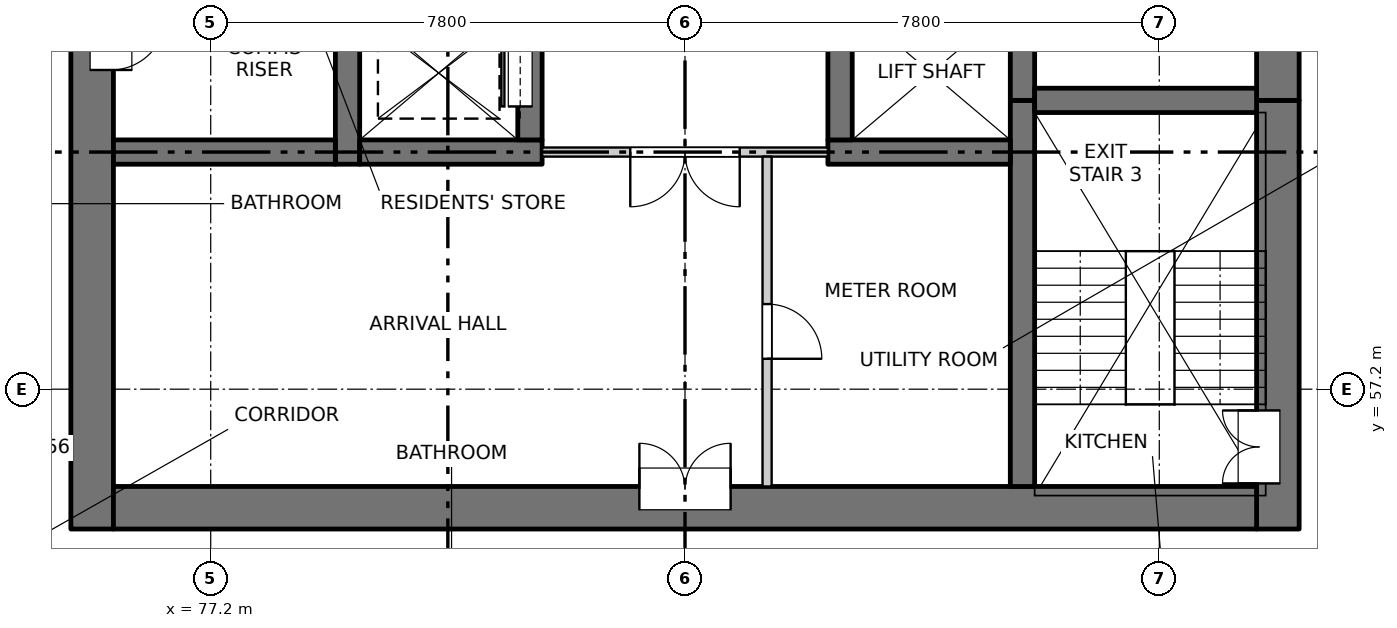
"""IFC4 building model, lengths in metres.
Left out: names, types, materials, properties, quantities, classifications, styles, units other than length and angle.
Written with IfcOpenShell. Run it as: python <this file> out.ifc"""

import sys

from ifc_helpers import new_model, si_unit, direction, frame, frame_2d, origin, place, context, subcontext, project, spatial, rectangle, extrude, element, fill, save


model = new_model("IFC4")
c1 = context("Model", 3, precision=1e-05, world=origin(), true_north=direction((0.0, 1.0)))
c2 = subcontext(c1, "Body", "Model", "MODEL_VIEW")
j1 = project(units=[si_unit("LENGTHUNIT", "METRE"), si_unit("PLANEANGLEUNIT", "RADIAN")], contexts=[c1])
p1 = place(None, origin())
s1 = spatial("IfcSite", under=j1, at=p1, CompositionType="ELEMENT")
p2 = place(p1, origin())
s2 = spatial("IfcBuilding", under=s1, at=p2, CompositionType="ELEMENT")
p3 = place(p2, frame((0.0, 0.0, 19.5)))
s3 = spatial("IfcBuildingStorey", under=s2, at=p3, CompositionType="ELEMENT", Elevation=19.5)
p4 = place(p3, frame((75.25, 54.9, -0.25), z_axis=(0.0, 0.0, 1.0), x_axis=(0.0, 1.0, 0.0)))
e1 = element("IfcWall", 1, at=p4, inside=s3, PredefinedType="SOLIDWALL", context=c2, shape_type="SweptSolid", body=[
    extrude(rectangle(XDim=22.4, YDim=0.7, at=frame_2d((11.2, 0.0))), origin(), (0.0, 0.0, 1.0), 3.4),
])
p5 = place(p4, frame((7.55, 0.0, 0.25)))
e2 = element("IfcOpeningElement", 2, at=p5, cuts=e1, PredefinedType="OPENING", context=c2, shape_type="SweptSolid", body=[
    extrude(rectangle(XDim=0.9, YDim=2.1, at=frame_2d((0.45, 1.05))), frame((0.0, 0.36, 0.0), z_axis=(0.0, -1.0, 0.0), x_axis=(1.0, 0.0, 0.0)), (0.0, 0.0, 1.0), 0.72),
])
p6 = place(p4, frame((10.85, 0.0, 0.25)))
e3 = element("IfcOpeningElement", 3, at=p6, cuts=e1, PredefinedType="OPENING", context=c2, shape_type="SweptSolid", body=[
    extrude(rectangle(XDim=0.9, YDim=2.1, at=frame_2d((0.45, 1.05))), frame((0.0, 0.36, 0.0), z_axis=(0.0, -1.0, 0.0), x_axis=(1.0, 0.0, 0.0)), (0.0, 0.0, 1.0), 0.72),
])
p7 = place(p4, frame((15.35, 0.0, 0.25)))
e4 = element("IfcOpeningElement", 4, at=p7, cuts=e1, PredefinedType="OPENING", context=c2, shape_type="SweptSolid", body=[
    extrude(rectangle(XDim=0.9, YDim=2.1, at=frame_2d((0.45, 1.05))), frame((0.0, 0.36, 0.0), z_axis=(0.0, -1.0, 0.0), x_axis=(1.0, 0.0, 0.0)), (0.0, 0.0, 1.0), 0.72),
])
p8 = place(p4, frame((20.15, 0.0, 0.25)))
e5 = element("IfcOpeningElement", 5, at=p8, cuts=e1, PredefinedType="OPENING", context=c2, shape_type="SweptSolid", body=[
    extrude(rectangle(XDim=0.9, YDim=2.1, at=frame_2d((0.45, 1.05))), frame((0.0, 0.36, 0.0), z_axis=(0.0, -1.0, 0.0), x_axis=(1.0, 0.0, 0.0)), (0.0, 0.0, 1.0), 0.72),
])
p9 = place(p3, frame((94.75, 54.9, -0.25), z_axis=(0.0, 0.0, 1.0), x_axis=(0.0, 1.0, 0.0)))
e6 = element("IfcWall", 6, at=p9, inside=s3, PredefinedType="SOLIDWALL", context=c2, shape_type="SweptSolid", body=[
    extrude(rectangle(XDim=7.05, YDim=0.7, at=frame_2d((3.525, 0.0))), origin(), (0.0, 0.0, 1.0), 3.4),
])
p10 = place(p9, frame((0.75, 0.0, 0.25)))
e7 = element("IfcOpeningElement", 7, at=p10, cuts=e6, PredefinedType="OPENING", context=c2, shape_type="SweptSolid", body=[
    extrude(rectangle(XDim=1.2, YDim=2.1, at=frame_2d((0.6, 1.05))), frame((0.0, 0.36, 0.0), z_axis=(0.0, -1.0, 0.0), x_axis=(1.0, 0.0, 0.0)), (0.0, 0.0, 1.0), 0.72),
])
p11 = place(p3, frame((94.75, 61.95, -0.25), z_axis=(0.0, 0.0, 1.0), x_axis=(0.0, 1.0, 0.0)))
e8 = element("IfcWall", 8, at=p11, inside=s3, PredefinedType="SOLIDWALL", context=c2, shape_type="SweptSolid", body=[
    extrude(rectangle(XDim=15.35, YDim=0.7, at=frame_2d((7.675, 0.0))), origin(), (0.0, 0.0, 1.0), 3.4),
])
p12 = place(p11, frame((0.925, 0.0, 0.25)))
e9 = element("IfcOpeningElement", 9, at=p12, cuts=e8, PredefinedType="OPENING", context=c2, shape_type="SweptSolid", body=[
    extrude(rectangle(XDim=0.9, YDim=2.1, at=frame_2d((0.45, 1.05))), frame((0.0, 0.36, 0.0), z_axis=(0.0, -1.0, 0.0), x_axis=(1.0, 0.0, 0.0)), (0.0, 0.0, 1.0), 0.72),
])
p13 = place(p11, frame((6.8, 0.0, 0.25)))
e10 = element("IfcOpeningElement", 10, at=p13, cuts=e8, PredefinedType="OPENING", context=c2, shape_type="SweptSolid", body=[
    extrude(rectangle(XDim=0.9, YDim=2.1, at=frame_2d((0.45, 1.05))), frame((0.0, 0.36, 0.0), z_axis=(0.0, -1.0, 0.0), x_axis=(1.0, 0.0, 0.0)), (0.0, 0.0, 1.0), 0.72),
])
p14 = place(p11, frame((13.1, 0.0, 0.25)))
e11 = element("IfcOpeningElement", 11, at=p14, cuts=e8, PredefinedType="OPENING", context=c2, shape_type="SweptSolid", body=[
    extrude(rectangle(XDim=0.9, YDim=2.1, at=frame_2d((0.45, 1.05))), frame((0.0, 0.36, 0.0), z_axis=(0.0, -1.0, 0.0), x_axis=(1.0, 0.0, 0.0)), (0.0, 0.0, 1.0), 0.72),
])
p15 = place(p3, frame((75.6, 55.25, -0.25), z_axis=(0.0, 0.0, 1.0), x_axis=(1.0, 0.0, 0.0)))
e12 = element("IfcWall", 12, at=p15, inside=s3, PredefinedType="SOLIDWALL", context=c2, shape_type="SweptSolid", body=[
    extrude(rectangle(XDim=18.8, YDim=0.7, at=frame_2d((9.4, 0.0))), origin(), (0.0, 0.0, 1.0), 3.4),
])
p16 = place(p15, frame((8.65, 0.0, 0.25)))
e13 = element("IfcOpeningElement", 13, at=p16, cuts=e12, PredefinedType="OPENING", context=c2, shape_type="SweptSolid", body=[
    extrude(rectangle(XDim=1.5, YDim=2.1, at=frame_2d((0.75, 1.05))), frame((0.0, 0.36, 0.0), z_axis=(0.0, -1.0, 0.0), x_axis=(1.0, 0.0, 0.0)), (0.0, 0.0, 1.0), 0.72),
])
p17 = place(p3, frame((79.45, 60.9, -0.25), z_axis=(0.0, 0.0, 1.0), x_axis=(0.0, 1.0, 0.0)))
e14 = element("IfcWall", 14, at=p17, inside=s3, PredefinedType="SOLIDWALL", context=c2, shape_type="SweptSolid", body=[
    extrude(rectangle(XDim=16.4, YDim=0.4, at=frame_2d((8.2, 0.0))), origin(), (0.0, 0.0, 1.0), 3.4),
])
p18 = place(p3, frame((90.55, 55.6, -0.25), z_axis=(0.0, 0.0, 1.0), x_axis=(0.0, 1.0, 0.0)))
e15 = element("IfcWall", 15, at=p18, inside=s3, PredefinedType="SOLIDWALL", context=c2, shape_type="SweptSolid", body=[
    extrude(rectangle(XDim=6.35, YDim=0.4, at=frame_2d((3.175, 0.0))), origin(), (0.0, 0.0, 1.0), 3.4),
])
p19 = place(p3, frame((90.55, 61.95, -0.25), z_axis=(0.0, 0.0, 1.0), x_axis=(0.0, 1.0, 0.0)))
e16 = element("IfcWall", 16, at=p19, inside=s3, PredefinedType="SOLIDWALL", context=c2, shape_type="SweptSolid", body=[
    extrude(rectangle(XDim=15.35, YDim=0.4, at=frame_2d((7.675, 0.0))), origin(), (0.0, 0.0, 1.0), 3.4),
])
p20 = place(p3, frame((79.65, 61.1, -0.25), z_axis=(0.0, 0.0, 1.0), x_axis=(1.0, 0.0, 0.0)))
e17 = element("IfcWall", 17, at=p20, inside=s3, PredefinedType="SOLIDWALL", context=c2, shape_type="SweptSolid", body=[
    extrude(rectangle(XDim=3.0, YDim=0.4, at=frame_2d((1.5, 0.0))), origin(), (0.0, 0.0, 1.0), 3.4),
])
p21 = place(p3, frame((82.45, 61.3, -0.25), z_axis=(0.0, 0.0, 1.0), x_axis=(0.0, 1.0, 0.0)))
e18 = element("IfcWall", 18, at=p21, inside=s3, PredefinedType="SOLIDWALL", context=c2, shape_type="SweptSolid", body=[
    extrude(rectangle(XDim=2.2, YDim=0.4, at=frame_2d((1.1, 0.0))), origin(), (0.0, 0.0, 1.0), 3.4),
])
p22 = place(p21, frame((0.55, 0.0, 0.25)))
e19 = element("IfcOpeningElement", 19, at=p22, cuts=e18, PredefinedType="OPENING", context=c2, shape_type="SweptSolid", body=[
    extrude(rectangle(XDim=1.1, YDim=2.1, at=frame_2d((0.55, 1.05))), frame((0.0, 0.21, 0.0), z_axis=(0.0, -1.0, 0.0), x_axis=(1.0, 0.0, 0.0)), (0.0, 0.0, 1.0), 0.42),
])
p23 = place(p3, frame((87.35, 61.1, -0.25), z_axis=(0.0, 0.0, 1.0), x_axis=(1.0, 0.0, 0.0)))
e20 = element("IfcWall", 20, at=p23, inside=s3, PredefinedType="SOLIDWALL", context=c2, shape_type="SweptSolid", body=[
    extrude(rectangle(XDim=3.0, YDim=0.4, at=frame_2d((1.5, 0.0))), origin(), (0.0, 0.0, 1.0), 3.4),
])
p24 = place(p3, frame((87.55, 61.3, -0.25), z_axis=(0.0, 0.0, 1.0), x_axis=(0.0, 1.0, 0.0)))
e21 = element("IfcWall", 21, at=p24, inside=s3, PredefinedType="SOLIDWALL", context=c2, shape_type="SweptSolid", body=[
    extrude(rectangle(XDim=2.2, YDim=0.4, at=frame_2d((1.1, 0.0))), origin(), (0.0, 0.0, 1.0), 3.4),
])
for number, where, z_axis, x_axis in (
    (22, (75.6, 61.1, -0.25), (0.0, 0.0, 1.0), (1.0, 0.0, 0.0)),
    (23, (90.75, 61.95, -0.25), (0.0, 0.0, 1.0), (1.0, 0.0, 0.0)),
):
    element("IfcWall", number, at=place(p3, frame(where, z_axis=z_axis, x_axis=x_axis)), inside=s3, PredefinedType="SOLIDWALL", context=c2, shape_type="SweptSolid", body=[
        extrude(rectangle(XDim=3.65, YDim=0.4, at=frame_2d((1.825, 0.0))), origin(), (0.0, 0.0, 1.0), 3.4),
    ])
p25 = place(p3, frame((82.65, 61.1, 0.0), z_axis=(0.0, 0.0, 1.0), x_axis=(1.0, 0.0, 0.0)))
e24 = element("IfcWall", 24, at=p25, inside=s3, PredefinedType="PARTITIONING", context=c2, shape_type="SweptSolid", body=[
    extrude(rectangle(XDim=4.7, YDim=0.15, at=frame_2d((2.35, 0.0))), origin(), (0.0, 0.0, 1.0), 3.15),
])
p26 = place(p25, frame((1.45, 0.0, 0.0)))
e25 = element("IfcOpeningElement", 25, at=p26, cuts=e24, PredefinedType="OPENING", context=c2, shape_type="SweptSolid", body=[
    extrude(rectangle(XDim=1.8, YDim=2.1, at=frame_2d((0.9, 1.05))), frame((0.0, 0.085, 0.0), z_axis=(0.0, -1.0, 0.0), x_axis=(1.0, 0.0, 0.0)), (0.0, 0.0, 1.0), 0.17),
])
p27 = place(p3, frame((86.35, 55.6, 0.0), z_axis=(0.0, 0.0, 1.0), x_axis=(0.0, 1.0, 0.0)))
e26 = element("IfcWall", 26, at=p27, inside=s3, PredefinedType="PARTITIONING", context=c2, shape_type="SweptSolid", body=[
    extrude(rectangle(XDim=5.425, YDim=0.15, at=frame_2d((2.712, 0.0))), origin(), (0.0, 0.0, 1.0), 3.15),
])
p28 = place(p27, frame((2.1, 0.0, 0.0)))
e27 = element("IfcOpeningElement", 27, at=p28, cuts=e26, PredefinedType="OPENING", context=c2, shape_type="SweptSolid", body=[
    extrude(rectangle(XDim=0.9, YDim=2.1, at=frame_2d((0.45, 1.05))), frame((0.0, 0.085, 0.0), z_axis=(0.0, -1.0, 0.0), x_axis=(1.0, 0.0, 0.0)), (0.0, 0.0, 1.0), 0.17),
])
p29 = place(p16, origin())
e28 = element("IfcDoor", 28, at=p29, inside=s3, OperationType="DOUBLE_DOOR_SINGLE_SWING", PredefinedType="DOOR", context=c2, shape_type="SweptSolid", body=[
    extrude(rectangle(XDim=1.5, YDim=2.1, at=frame_2d((0.75, 1.05))), frame((0.0, 0.335, 0.0), z_axis=(0.0, -1.0, 0.0), x_axis=(1.0, 0.0, 0.0)), (0.0, 0.0, 1.0), 0.05),
])
fill(e13, e28)
p30 = place(p10, origin())
e29 = element("IfcDoor", 29, at=p30, inside=s3, OperationType="DOUBLE_DOOR_SINGLE_SWING", PredefinedType="DOOR", context=c2, shape_type="SweptSolid", body=[
    extrude(rectangle(XDim=1.2, YDim=2.1, at=frame_2d((0.6, 1.05))), frame((0.0, 0.335, 0.0), z_axis=(0.0, -1.0, 0.0), x_axis=(1.0, 0.0, 0.0)), (0.0, 0.0, 1.0), 0.05),
])
fill(e7, e29)
p31 = place(p28, origin())
e30 = element("IfcDoor", 30, at=p31, inside=s3, OperationType="SINGLE_SWING_RIGHT", PredefinedType="DOOR", context=c2, shape_type="SweptSolid", body=[
    extrude(rectangle(XDim=0.9, YDim=2.1, at=frame_2d((0.45, 1.05))), frame((0.0, 0.025, 0.0), z_axis=(0.0, -1.0, 0.0), x_axis=(1.0, 0.0, 0.0)), (0.0, 0.0, 1.0), 0.05),
])
fill(e27, e30)
p32 = place(p26, origin())
e31 = element("IfcDoor", 31, at=p32, inside=s3, OperationType="DOUBLE_DOOR_SINGLE_SWING", PredefinedType="DOOR", context=c2, shape_type="SweptSolid", body=[
    extrude(rectangle(XDim=1.8, YDim=2.1, at=frame_2d((0.9, 1.05))), frame((0.0, 0.025, 0.0), z_axis=(0.0, -1.0, 0.0), x_axis=(1.0, 0.0, 0.0)), (0.0, 0.0, 1.0), 0.05),
])
fill(e25, e31)
p33 = place(p22, origin())
e32 = element("IfcDoor", 32, at=p33, inside=s3, OperationType="SLIDING_TO_RIGHT", PredefinedType="DOOR", context=c2, shape_type="SweptSolid", body=[
    extrude(rectangle(XDim=1.1, YDim=2.1, at=frame_2d((0.55, 1.05))), frame((0.0, 0.185, 0.0), z_axis=(0.0, -1.0, 0.0), x_axis=(1.0, 0.0, 0.0)), (0.0, 0.0, 1.0), 0.05),
])
fill(e19, e32)
p34 = place(p5, origin())
e33 = element("IfcDoor", 33, at=p34, inside=s3, OperationType="SINGLE_SWING_LEFT", PredefinedType="DOOR", context=c2, shape_type="SweptSolid", body=[
    extrude(rectangle(XDim=0.9, YDim=2.1, at=frame_2d((0.45, 1.05))), frame((0.0, -0.285, 0.0), z_axis=(0.0, -1.0, 0.0), x_axis=(1.0, 0.0, 0.0)), (0.0, 0.0, 1.0), 0.05),
])
fill(e2, e33)
save(model, sys.argv[1])
